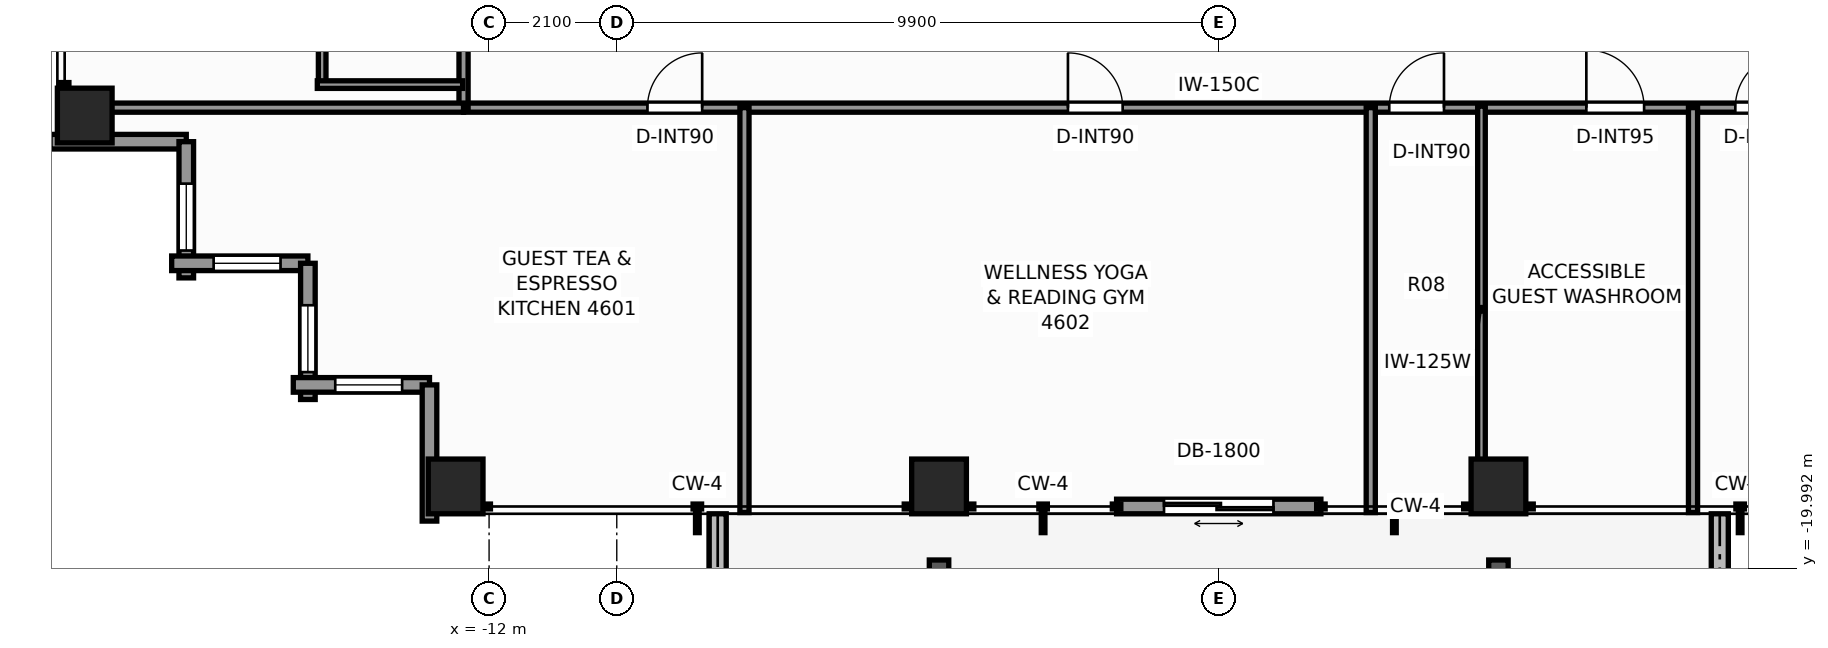
"""IFC4 building model, lengths in metres.
Left out: names, types, materials, properties, quantities, classifications, styles, units other than length and angle.
Written with IfcOpenShell. Run it as: python <this file> out.ifc"""

import sys

from ifc_helpers import new_model, si_unit, direction, frame, frame_2d, origin, origin_2d, place, context, subcontext, project, spatial, rectangle, extrude, element, fill, save


model = new_model("IFC4")
c1 = context("Model", 3, precision=1e-05, world=origin(), true_north=direction((0.0, 1.0)))
c2 = subcontext(c1, "Body", "Model", "MODEL_VIEW")
j1 = project(units=[si_unit("LENGTHUNIT", "METRE"), si_unit("PLANEANGLEUNIT", "RADIAN")], contexts=[c1])
p1 = place(None, origin())
s1 = spatial("IfcSite", under=j1, at=p1, CompositionType="ELEMENT")
p2 = place(p1, origin())
s2 = spatial("IfcBuilding", under=s1, at=p2, CompositionType="ELEMENT")
p3 = place(p2, frame((0.0, 0.0, 160.2)))
s3 = spatial("IfcBuildingStorey", under=s2, at=p3, CompositionType="ELEMENT", Elevation=160.2)
for number, where, z_axis, x_axis in (
    (1, (-12.55, -18.65, 0.0), (0.0, 0.0, 1.0), (1.0, 0.0, 0.0)),
    (2, (-4.6, -18.65, 0.0), (0.0, 0.0, 1.0), (1.0, 0.0, 0.0)),
    (3, (4.6, -18.65, 0.0), (0.0, 0.0, 1.0), (1.0, 0.0, 0.0)),
    (4, (-18.65, -12.55, 0.0), (0.0, 0.0, 1.0), (1.0, 0.0, 0.0)),
):
    element("IfcColumn", number, at=place(p3, frame(where, z_axis=z_axis, x_axis=x_axis)), inside=s3, PredefinedType="COLUMN", context=c2, shape_type="SweptSolid", body=[
        extrude(rectangle(XDim=0.9, YDim=0.9, at=origin_2d()), origin(), (0.0, 0.0, 1.0), 3.3),
    ])
p4 = place(p3, frame((8.24, -22.52, -0.02), z_axis=(0.0, 0.0, 1.0), x_axis=(0.0, 1.0, 0.0)))
e5 = element("IfcWall", 5, at=p4, inside=s3, PredefinedType="PARAPET", context=c2, shape_type="SweptSolid", body=[
    extrude(rectangle(XDim=3.42, YDim=0.28, at=frame_2d((1.71, 0.0))), origin(), (0.0, 0.0, 1.0), 0.42),
])
p5 = place(p3, frame((-8.24, -19.1, -0.02), z_axis=(0.0, 0.0, 1.0), x_axis=(0.0, -1.0, 0.0)))
e6 = element("IfcWall", 6, at=p5, inside=s3, PredefinedType="PARAPET", context=c2, shape_type="SweptSolid", body=[
    extrude(rectangle(XDim=2.674, YDim=0.28, at=frame_2d((1.337, 0.0))), origin(), (0.0, 0.0, 1.0), 0.42),
])
p6 = place(p3, frame((1.68, -18.98, 0.0), z_axis=(0.0, 0.0, 1.0), x_axis=(-1.0, 0.0, 0.0)))
e7 = element("IfcWall", 7, at=p6, inside=s3, PredefinedType="STANDARD", context=c2, shape_type="SweptSolid", body=[
    extrude(rectangle(XDim=3.36, YDim=0.24, at=frame_2d((1.68, 0.0))), origin(), (0.0, 0.0, 1.0), 3.1),
])
p7 = place(p6, frame((0.78, 0.0, 0.0)))
e8 = element("IfcOpeningElement", 8, at=p7, cuts=e7, PredefinedType="OPENING", context=c2, shape_type="SweptSolid", body=[
    extrude(rectangle(XDim=1.8, YDim=2.2, at=frame_2d((0.9, 1.1))), frame((0.0, 0.13, 0.0), z_axis=(0.0, -1.0, 0.0), x_axis=(1.0, 0.0, 0.0)), (0.0, 0.0, 1.0), 0.26),
])
p8 = place(p3, frame((-16.98, -12.98, 0.0), z_axis=(0.0, 0.0, 1.0), x_axis=(-1.0, 0.0, 0.0)))
e9 = element("IfcWall", 9, at=p8, inside=s3, PredefinedType="STANDARD", context=c2, shape_type="SweptSolid", body=[
    extrude(rectangle(XDim=2.24, YDim=0.24, at=frame_2d((1.12, 0.0))), origin(), (0.0, 0.0, 1.0), 2.483),
])
p9 = place(p3, frame((-16.98, -15.22, 0.0), z_axis=(0.0, 0.0, 1.0), x_axis=(0.0, 1.0, 0.0)))
e10 = element("IfcWall", 10, at=p9, inside=s3, PredefinedType="STANDARD", context=c2, shape_type="SweptSolid", body=[
    extrude(rectangle(XDim=2.24, YDim=0.24, at=frame_2d((1.12, 0.0))), origin(), (0.0, 0.0, 1.0), 2.483),
])
p10 = place(p9, frame((0.45, 0.0, 0.65)))
e11 = element("IfcOpeningElement", 11, at=p10, cuts=e10, PredefinedType="OPENING", context=c2, shape_type="SweptSolid", body=[
    extrude(rectangle(XDim=1.1, YDim=1.45, at=frame_2d((0.55, 0.725))), frame((0.0, 0.13, 0.0), z_axis=(0.0, -1.0, 0.0), x_axis=(1.0, 0.0, 0.0)), (0.0, 0.0, 1.0), 0.26),
])
p11 = place(p3, frame((-14.98, -14.98, 0.0), z_axis=(0.0, 0.0, 1.0), x_axis=(-1.0, 0.0, 0.0)))
e12 = element("IfcWall", 12, at=p11, inside=s3, PredefinedType="STANDARD", context=c2, shape_type="SweptSolid", body=[
    extrude(rectangle(XDim=2.24, YDim=0.24, at=frame_2d((1.12, 0.0))), origin(), (0.0, 0.0, 1.0), 2.483),
])
p12 = place(p11, frame((0.45, 0.0, 0.65)))
e13 = element("IfcOpeningElement", 13, at=p12, cuts=e12, PredefinedType="OPENING", context=c2, shape_type="SweptSolid", body=[
    extrude(rectangle(XDim=1.1, YDim=1.45, at=frame_2d((0.55, 0.725))), frame((0.0, 0.13, 0.0), z_axis=(0.0, -1.0, 0.0), x_axis=(1.0, 0.0, 0.0)), (0.0, 0.0, 1.0), 0.26),
])
p13 = place(p3, frame((-14.98, -17.22, 0.0), z_axis=(0.0, 0.0, 1.0), x_axis=(0.0, 1.0, 0.0)))
e14 = element("IfcWall", 14, at=p13, inside=s3, PredefinedType="STANDARD", context=c2, shape_type="SweptSolid", body=[
    extrude(rectangle(XDim=2.24, YDim=0.24, at=frame_2d((1.12, 0.0))), origin(), (0.0, 0.0, 1.0), 2.483),
])
p14 = place(p13, frame((0.45, 0.0, 0.65)))
e15 = element("IfcOpeningElement", 15, at=p14, cuts=e14, PredefinedType="OPENING", context=c2, shape_type="SweptSolid", body=[
    extrude(rectangle(XDim=1.1, YDim=1.45, at=frame_2d((0.55, 0.725))), frame((0.0, 0.13, 0.0), z_axis=(0.0, -1.0, 0.0), x_axis=(1.0, 0.0, 0.0)), (0.0, 0.0, 1.0), 0.26),
])
p15 = place(p3, frame((-12.98, -16.98, 0.0), z_axis=(0.0, 0.0, 1.0), x_axis=(-1.0, 0.0, 0.0)))
e16 = element("IfcWall", 16, at=p15, inside=s3, PredefinedType="STANDARD", context=c2, shape_type="SweptSolid", body=[
    extrude(rectangle(XDim=2.24, YDim=0.24, at=frame_2d((1.12, 0.0))), origin(), (0.0, 0.0, 1.0), 2.483),
])
p16 = place(p15, frame((0.45, 0.0, 0.65)))
e17 = element("IfcOpeningElement", 17, at=p16, cuts=e16, PredefinedType="OPENING", context=c2, shape_type="SweptSolid", body=[
    extrude(rectangle(XDim=1.1, YDim=1.45, at=frame_2d((0.55, 0.725))), frame((0.0, 0.13, 0.0), z_axis=(0.0, -1.0, 0.0), x_axis=(1.0, 0.0, 0.0)), (0.0, 0.0, 1.0), 0.26),
])
p17 = place(p3, frame((-12.98, -19.22, 0.0), z_axis=(0.0, 0.0, 1.0), x_axis=(0.0, 1.0, 0.0)))
e18 = element("IfcWall", 18, at=p17, inside=s3, PredefinedType="STANDARD", context=c2, shape_type="SweptSolid", body=[
    extrude(rectangle(XDim=2.24, YDim=0.24, at=frame_2d((1.12, 0.0))), origin(), (0.0, 0.0, 1.0), 2.483),
])
p18 = place(p3, frame((-12.42, -12.42, 0.0), z_axis=(0.0, 0.0, 1.0), x_axis=(1.0, 0.0, 0.0)))
e19 = element("IfcWall", 19, at=p18, inside=s3, PredefinedType="PARTITIONING", context=c2, shape_type="SweptSolid", body=[
    extrude(rectangle(XDim=24.84, YDim=0.15, at=frame_2d((12.42, 0.0))), origin(), (0.0, 0.0, 1.0), 2.389),
])
p19 = place(p18, frame((3.024, 0.0, 0.0)))
e20 = element("IfcOpeningElement", 20, at=p19, cuts=e19, PredefinedType="OPENING", context=c2, shape_type="SweptSolid", body=[
    extrude(rectangle(XDim=0.9, YDim=2.06, at=frame_2d((0.45, 1.03))), frame((0.0, 0.085, 0.0), z_axis=(0.0, -1.0, 0.0), x_axis=(1.0, 0.0, 0.0)), (0.0, 0.0, 1.0), 0.17),
])
p20 = place(p18, frame((9.94, 0.0, 0.0)))
e21 = element("IfcOpeningElement", 21, at=p20, cuts=e19, PredefinedType="OPENING", context=c2, shape_type="SweptSolid", body=[
    extrude(rectangle(XDim=0.9, YDim=2.06, at=frame_2d((0.45, 1.03))), frame((0.0, 0.085, 0.0), z_axis=(0.0, -1.0, 0.0), x_axis=(1.0, 0.0, 0.0)), (0.0, 0.0, 1.0), 0.17),
])
p21 = place(p18, frame((15.224, 0.0, 0.0)))
e22 = element("IfcOpeningElement", 22, at=p21, cuts=e19, PredefinedType="OPENING", context=c2, shape_type="SweptSolid", body=[
    extrude(rectangle(XDim=0.9, YDim=2.06, at=frame_2d((0.45, 1.03))), frame((0.0, 0.085, 0.0), z_axis=(0.0, -1.0, 0.0), x_axis=(1.0, 0.0, 0.0)), (0.0, 0.0, 1.0), 0.17),
])
p22 = place(p18, frame((18.466, 0.0, 0.0)))
e23 = element("IfcOpeningElement", 23, at=p22, cuts=e19, PredefinedType="OPENING", context=c2, shape_type="SweptSolid", body=[
    extrude(rectangle(XDim=0.95, YDim=2.06, at=frame_2d((0.475, 1.03))), frame((0.0, 0.085, 0.0), z_axis=(0.0, -1.0, 0.0), x_axis=(1.0, 0.0, 0.0)), (0.0, 0.0, 1.0), 0.17),
])
p23 = place(p18, frame((20.916, 0.0, 0.0)))
e24 = element("IfcOpeningElement", 24, at=p23, cuts=e19, PredefinedType="OPENING", context=c2, shape_type="SweptSolid", body=[
    extrude(rectangle(XDim=0.9, YDim=2.06, at=frame_2d((0.45, 1.03))), frame((0.0, 0.085, 0.0), z_axis=(0.0, -1.0, 0.0), x_axis=(1.0, 0.0, 0.0)), (0.0, 0.0, 1.0), 0.17),
])
p24 = place(p3, frame((-12.42, -12.42, 0.0), z_axis=(0.0, 0.0, 1.0), x_axis=(0.0, 1.0, 0.0)))
e25 = element("IfcWall", 25, at=p24, inside=s3, PredefinedType="PARTITIONING", context=c2, shape_type="SweptSolid", body=[
    extrude(rectangle(XDim=24.84, YDim=0.15, at=frame_2d((12.42, 0.0))), origin(), (0.0, 0.0, 1.0), 2.389),
])
p25 = place(p24, frame((3.831, 0.0, 0.0)))
e26 = element("IfcOpeningElement", 26, at=p25, cuts=e25, PredefinedType="OPENING", context=c2, shape_type="SweptSolid", body=[
    extrude(rectangle(XDim=0.95, YDim=2.06, at=frame_2d((0.475, 1.03))), frame((0.0, 0.085, 0.0), z_axis=(0.0, -1.0, 0.0), x_axis=(1.0, 0.0, 0.0)), (0.0, 0.0, 1.0), 0.17),
])
p26 = place(p24, frame((10.012, 0.0, 0.0)))
e27 = element("IfcOpeningElement", 27, at=p26, cuts=e25, PredefinedType="OPENING", context=c2, shape_type="SweptSolid", body=[
    extrude(rectangle(XDim=0.95, YDim=2.06, at=frame_2d((0.475, 1.03))), frame((0.0, 0.085, 0.0), z_axis=(0.0, -1.0, 0.0), x_axis=(1.0, 0.0, 0.0)), (0.0, 0.0, 1.0), 0.17),
])
p27 = place(p24, frame((19.504, 0.0, 0.0)))
e28 = element("IfcOpeningElement", 28, at=p27, cuts=e25, PredefinedType="OPENING", context=c2, shape_type="SweptSolid", body=[
    extrude(rectangle(XDim=0.95, YDim=2.06, at=frame_2d((0.475, 1.03))), frame((0.0, 0.085, 0.0), z_axis=(0.0, -1.0, 0.0), x_axis=(1.0, 0.0, 0.0)), (0.0, 0.0, 1.0), 0.17),
])
p28 = place(p3, frame((-19.08, -12.42, 0.0), z_axis=(0.0, 0.0, 1.0), x_axis=(1.0, 0.0, 0.0)))
e29 = element("IfcWall", 29, at=p28, inside=s3, PredefinedType="PARTITIONING", context=c2, shape_type="SweptSolid", body=[
    extrude(rectangle(XDim=6.66, YDim=0.15, at=frame_2d((3.33, 0.0))), origin(), (0.0, 0.0, 1.0), 2.389),
])
for number, where, z_axis, x_axis in (
    (30, (-7.8, -19.08, 0.0), (0.0, 0.0, 1.0), (0.0, 1.0, 0.0)),
    (31, (2.5, -19.08, 0.0), (0.0, 0.0, 1.0), (0.0, 1.0, 0.0)),
    (32, (7.8, -19.08, 0.0), (0.0, 0.0, 1.0), (0.0, 1.0, 0.0)),
):
    element("IfcWall", number, at=place(p3, frame(where, z_axis=z_axis, x_axis=x_axis)), inside=s3, PredefinedType="PARTITIONING", context=c2, shape_type="SweptSolid", body=[
        extrude(rectangle(XDim=6.66, YDim=0.15, at=frame_2d((3.33, 0.0))), origin(), (0.0, 0.0, 1.0), 2.473),
    ])
p29 = place(p3, frame((4.321, -19.08, 0.0), z_axis=(0.0, 0.0, 1.0), x_axis=(0.0, 1.0, 0.0)))
e33 = element("IfcWall", 33, at=p29, inside=s3, PredefinedType="PARTITIONING", context=c2, shape_type="SweptSolid", body=[
    extrude(rectangle(XDim=6.685, YDim=0.125, at=frame_2d((3.343, 0.0))), origin(), (0.0, 0.0, 1.0), 2.473),
])
p30 = place(p3, frame((-14.745, -12.101, 0.0), z_axis=(0.0, 0.0, 1.0), x_axis=(0.0, 1.0, 0.0)))
e34 = element("IfcWall", 34, at=p30, inside=s3, PredefinedType="PARTITIONING", context=c2, shape_type="SweptSolid", body=[
    extrude(rectangle(XDim=2.77, YDim=0.125, at=frame_2d((1.385, 0.0))), origin(), (0.0, 0.0, 1.0), 2.389),
])
p31 = place(p3, frame((-14.825, -12.041, 0.0), z_axis=(0.0, 0.0, 1.0), x_axis=(1.0, 0.0, 0.0)))
e35 = element("IfcWall", 35, at=p31, inside=s3, PredefinedType="PARTITIONING", context=c2, shape_type="SweptSolid", body=[
    extrude(rectangle(XDim=2.39, YDim=0.125, at=frame_2d((1.195, 0.0))), origin(), (0.0, 0.0, 1.0), 3.1),
])
p32 = place(p7, origin())
e36 = element("IfcDoor", 36, at=p32, inside=s3, OperationType="DOUBLE_DOOR_SLIDING", PredefinedType="DOOR", context=c2, shape_type="SweptSolid", body=[
    extrude(rectangle(XDim=1.8, YDim=2.2, at=frame_2d((0.9, 1.1))), frame((0.0, 0.025, 0.0), z_axis=(0.0, -1.0, 0.0), x_axis=(1.0, 0.0, 0.0)), (0.0, 0.0, 1.0), 0.05),
])
fill(e8, e36)
p33 = place(p10, origin())
e37 = element("IfcWindow", 37, at=p33, inside=s3, PartitioningType="SINGLE_PANEL", PredefinedType="WINDOW", context=c2, shape_type="SweptSolid", body=[
    extrude(rectangle(XDim=1.1, YDim=1.45, at=frame_2d((0.55, 0.725))), frame((0.0, 0.03, 0.0), z_axis=(0.0, -1.0, 0.0), x_axis=(1.0, 0.0, 0.0)), (0.0, 0.0, 1.0), 0.06),
])
fill(e11, e37)
p34 = place(p12, origin())
e38 = element("IfcWindow", 38, at=p34, inside=s3, PartitioningType="SINGLE_PANEL", PredefinedType="WINDOW", context=c2, shape_type="SweptSolid", body=[
    extrude(rectangle(XDim=1.1, YDim=1.45, at=frame_2d((0.55, 0.725))), frame((0.0, 0.03, 0.0), z_axis=(0.0, -1.0, 0.0), x_axis=(1.0, 0.0, 0.0)), (0.0, 0.0, 1.0), 0.06),
])
fill(e13, e38)
p35 = place(p14, origin())
e39 = element("IfcWindow", 39, at=p35, inside=s3, PartitioningType="SINGLE_PANEL", PredefinedType="WINDOW", context=c2, shape_type="SweptSolid", body=[
    extrude(rectangle(XDim=1.1, YDim=1.45, at=frame_2d((0.55, 0.725))), frame((0.0, 0.03, 0.0), z_axis=(0.0, -1.0, 0.0), x_axis=(1.0, 0.0, 0.0)), (0.0, 0.0, 1.0), 0.06),
])
fill(e15, e39)
p36 = place(p16, origin())
e40 = element("IfcWindow", 40, at=p36, inside=s3, PartitioningType="SINGLE_PANEL", PredefinedType="WINDOW", context=c2, shape_type="SweptSolid", body=[
    extrude(rectangle(XDim=1.1, YDim=1.45, at=frame_2d((0.55, 0.725))), frame((0.0, 0.03, 0.0), z_axis=(0.0, -1.0, 0.0), x_axis=(1.0, 0.0, 0.0)), (0.0, 0.0, 1.0), 0.06),
])
fill(e17, e40)
p37 = place(p19, origin())
e41 = element("IfcDoor", 41, at=p37, inside=s3, OperationType="SINGLE_SWING_RIGHT", PredefinedType="DOOR", context=c2, shape_type="SweptSolid", body=[
    extrude(rectangle(XDim=0.9, YDim=2.06, at=frame_2d((0.45, 1.03))), frame((0.0, 0.025, 0.0), z_axis=(0.0, -1.0, 0.0), x_axis=(1.0, 0.0, 0.0)), (0.0, 0.0, 1.0), 0.05),
])
fill(e20, e41)
p38 = place(p20, origin())
e42 = element("IfcDoor", 42, at=p38, inside=s3, OperationType="SINGLE_SWING_LEFT", PredefinedType="DOOR", context=c2, shape_type="SweptSolid", body=[
    extrude(rectangle(XDim=0.9, YDim=2.06, at=frame_2d((0.45, 1.03))), frame((0.0, 0.025, 0.0), z_axis=(0.0, -1.0, 0.0), x_axis=(1.0, 0.0, 0.0)), (0.0, 0.0, 1.0), 0.05),
])
fill(e21, e42)
p39 = place(p21, origin())
e43 = element("IfcDoor", 43, at=p39, inside=s3, OperationType="SINGLE_SWING_RIGHT", PredefinedType="DOOR", context=c2, shape_type="SweptSolid", body=[
    extrude(rectangle(XDim=0.9, YDim=2.06, at=frame_2d((0.45, 1.03))), frame((0.0, 0.025, 0.0), z_axis=(0.0, -1.0, 0.0), x_axis=(1.0, 0.0, 0.0)), (0.0, 0.0, 1.0), 0.05),
])
fill(e22, e43)
p40 = place(p22, origin())
e44 = element("IfcDoor", 44, at=p40, inside=s3, OperationType="SINGLE_SWING_LEFT", PredefinedType="DOOR", context=c2, shape_type="SweptSolid", body=[
    extrude(rectangle(XDim=0.95, YDim=2.06, at=frame_2d((0.475, 1.03))), frame((0.0, 0.025, 0.0), z_axis=(0.0, -1.0, 0.0), x_axis=(1.0, 0.0, 0.0)), (0.0, 0.0, 1.0), 0.05),
])
fill(e23, e44)
p41 = place(p23, origin())
e45 = element("IfcDoor", 45, at=p41, inside=s3, OperationType="SINGLE_SWING_RIGHT", PredefinedType="DOOR", context=c2, shape_type="SweptSolid", body=[
    extrude(rectangle(XDim=0.9, YDim=2.06, at=frame_2d((0.45, 1.03))), frame((0.0, 0.025, 0.0), z_axis=(0.0, -1.0, 0.0), x_axis=(1.0, 0.0, 0.0)), (0.0, 0.0, 1.0), 0.05),
])
fill(e24, e45)
save(model, sys.argv[1])
